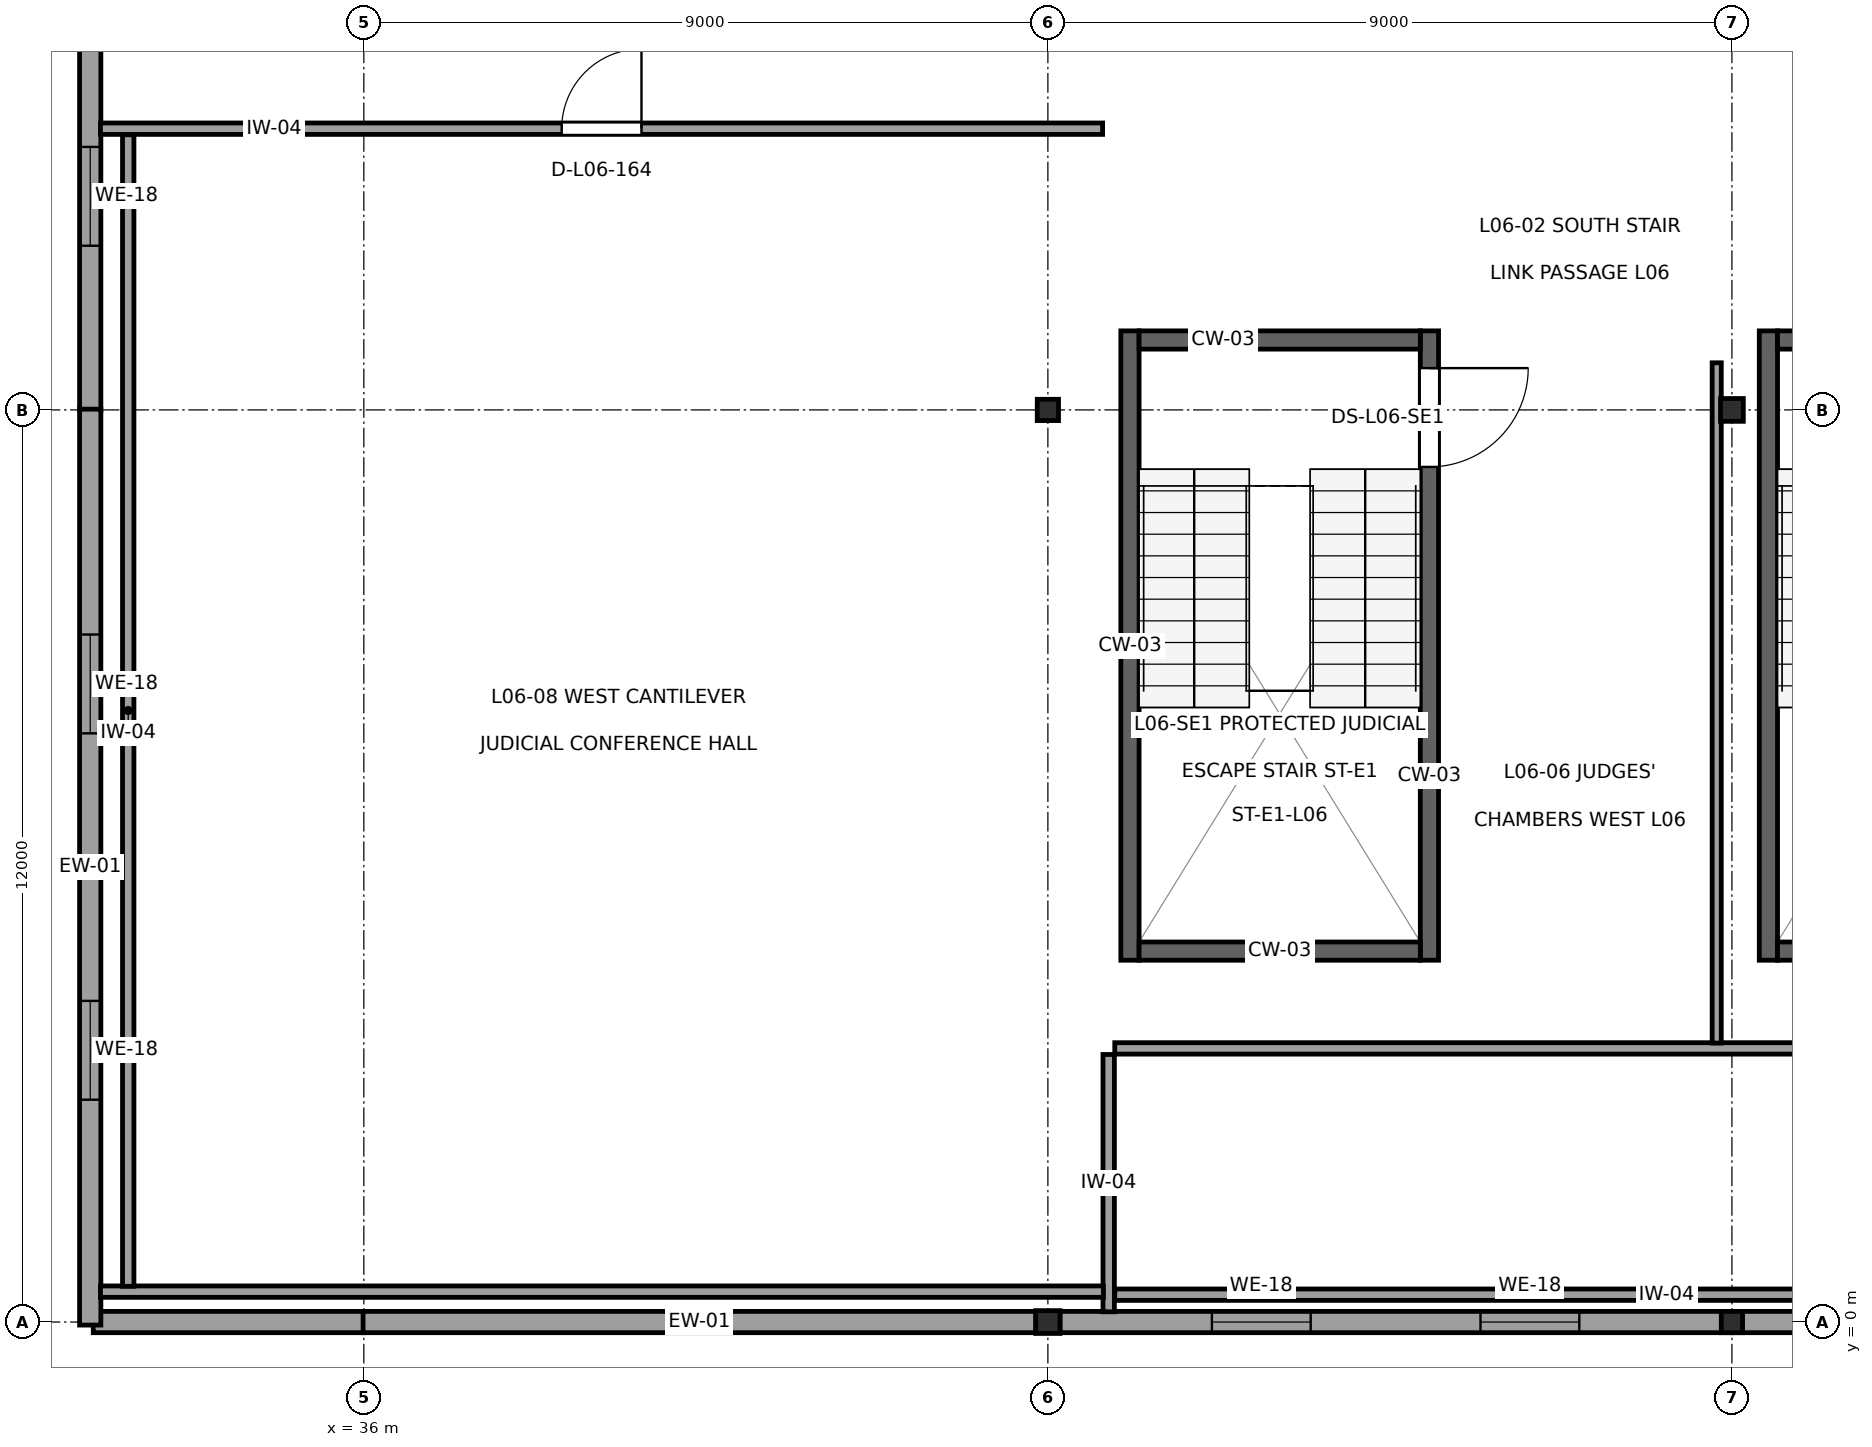
"""IFC4 building model, lengths in metres.
Left out: names, types, materials, properties, quantities, classifications, styles, units other than length and angle.
Written with IfcOpenShell. Run it as: python <this file> out.ifc"""

import sys

from ifc_helpers import new_model, si_unit, direction, frame, frame_2d, origin, origin_2d, place, context, subcontext, project, spatial, rectangle, i_section, extrude, element, fill, save


model = new_model("IFC4")
c1 = context("Model", 3, precision=1e-05, world=origin(), true_north=direction((0.0, 1.0)))
c2 = subcontext(c1, "Body", "Model", "MODEL_VIEW")
j1 = project(units=[si_unit("LENGTHUNIT", "METRE"), si_unit("PLANEANGLEUNIT", "RADIAN")], contexts=[c1])
p1 = place(None, origin())
s1 = spatial("IfcSite", under=j1, at=p1, CompositionType="ELEMENT")
p2 = place(p1, origin())
s2 = spatial("IfcBuilding", under=s1, at=p2, CompositionType="ELEMENT")
p3 = place(p2, frame((0.0, 0.0, 27.4)))
s3 = spatial("IfcBuildingStorey", under=s2, at=p3, CompositionType="ELEMENT", Elevation=27.4)
p4 = place(p3, frame((45.0, 0.0, 0.0), z_axis=(0.0, 0.0, 1.0), x_axis=(0.0, 1.0, 0.0)))
e1 = element("IfcColumn", 1, at=p4, inside=s3, PredefinedType="COLUMN", context=c2, shape_type="SweptSolid", body=[
    extrude(i_section(OverallWidth=0.3, OverallDepth=0.32, WebThickness=0.011, FlangeThickness=0.021, at=origin_2d()), origin(), (0.0, 0.0, 1.0), 4.0),
])
for number, where, z_axis, x_axis in (
    (2, (45.0, 12.0, 0.0), (0.0, 0.0, 1.0), (1.0, 0.0, 0.0)),
    (3, (54.0, 0.0, 0.0), (0.0, 0.0, 1.0), (1.0, 0.0, 0.0)),
):
    element("IfcColumn", number, at=place(p3, frame(where, z_axis=z_axis, x_axis=x_axis)), inside=s3, PredefinedType="COLUMN", context=c2, shape_type="SweptSolid", body=[
        extrude(i_section(OverallWidth=0.28, OverallDepth=0.28, WebThickness=0.01, FlangeThickness=0.018, at=origin_2d()), origin(), (0.0, 0.0, 1.0), 4.0),
    ])
p5 = place(p3, frame((54.0, 12.0, 0.0), z_axis=(0.0, 0.0, 1.0), x_axis=(1.0, 0.0, 0.0)))
e4 = element("IfcColumn", 4, at=p5, inside=s3, PredefinedType="COLUMN", context=c2, shape_type="SweptSolid", body=[
    extrude(i_section(OverallWidth=0.3, OverallDepth=0.3, WebThickness=0.011, FlangeThickness=0.019, at=origin_2d()), origin(), (0.0, 0.0, 1.0), 4.0),
])
p6 = place(p3, frame((32.44, 0.0, 0.0), z_axis=(0.0, 0.0, 1.0), x_axis=(1.0, 0.0, 0.0)))
e5 = element("IfcWall", 5, at=p6, inside=s3, PredefinedType="SOLIDWALL", context=c2, shape_type="SweptSolid", body=[
    extrude(rectangle(XDim=3.57, YDim=0.28, at=frame_2d((1.785, 0.0))), origin(), (0.0, 0.0, 1.0), 2.787),
])
p7 = place(p3, frame((35.99, 0.0, 0.0), z_axis=(0.0, 0.0, 1.0), x_axis=(1.0, 0.0, 0.0)))
e6 = element("IfcWall", 6, at=p7, inside=s3, PredefinedType="SOLIDWALL", context=c2, shape_type="SweptSolid", body=[
    extrude(rectangle(XDim=8.852, YDim=0.28, at=frame_2d((4.426, 0.0))), origin(), (0.0, 0.0, 1.0), 2.787),
])
p8 = place(p3, frame((45.158, 0.0, 0.0), z_axis=(0.0, 0.0, 1.0), x_axis=(1.0, 0.0, 0.0)))
e7 = element("IfcWall", 7, at=p8, inside=s3, PredefinedType="SOLIDWALL", context=c2, shape_type="SweptSolid", body=[
    extrude(rectangle(XDim=8.834, YDim=0.28, at=frame_2d((4.417, 0.0))), origin(), (0.0, 0.0, 1.0), 2.787),
])
p9 = place(p8, frame((2.0, 0.0, 1.05)))
e8 = element("IfcOpeningElement", 8, at=p9, cuts=e7, PredefinedType="OPENING", context=c2, shape_type="SweptSolid", body=[
    extrude(rectangle(XDim=1.3, YDim=1.3, at=frame_2d((0.65, 0.65))), frame((0.0, 0.155, 0.0), z_axis=(0.0, -1.0, 0.0), x_axis=(1.0, 0.0, 0.0)), (0.0, 0.0, 1.0), 0.31),
])
p10 = place(p8, frame((5.534, 0.0, 1.05)))
e9 = element("IfcOpeningElement", 9, at=p10, cuts=e7, PredefinedType="OPENING", context=c2, shape_type="SweptSolid", body=[
    extrude(rectangle(XDim=1.3, YDim=1.3, at=frame_2d((0.65, 0.65))), frame((0.0, 0.155, 0.0), z_axis=(0.0, -1.0, 0.0), x_axis=(1.0, 0.0, 0.0)), (0.0, 0.0, 1.0), 0.31),
])
p11 = place(p3, frame((54.008, 0.0, 0.0), z_axis=(0.0, 0.0, 1.0), x_axis=(1.0, 0.0, 0.0)))
e10 = element("IfcWall", 10, at=p11, inside=s3, PredefinedType="SOLIDWALL", context=c2, shape_type="SweptSolid", body=[
    extrude(rectangle(XDim=8.984, YDim=0.28, at=frame_2d((4.492, 0.0))), origin(), (0.0, 0.0, 1.0), 2.787),
])
p12 = place(p11, frame((2.045, 0.0, 1.05)))
e11 = element("IfcOpeningElement", 11, at=p12, cuts=e10, PredefinedType="OPENING", context=c2, shape_type="SweptSolid", body=[
    extrude(rectangle(XDim=1.3, YDim=1.3, at=frame_2d((0.65, 0.65))), frame((0.0, 0.155, 0.0), z_axis=(0.0, -1.0, 0.0), x_axis=(1.0, 0.0, 0.0)), (0.0, 0.0, 1.0), 0.31),
])
p13 = place(p11, frame((5.639, 0.0, 1.05)))
e12 = element("IfcOpeningElement", 12, at=p13, cuts=e10, PredefinedType="OPENING", context=c2, shape_type="SweptSolid", body=[
    extrude(rectangle(XDim=1.3, YDim=1.3, at=frame_2d((0.65, 0.65))), frame((0.0, 0.155, 0.0), z_axis=(0.0, -1.0, 0.0), x_axis=(1.0, 0.0, 0.0)), (0.0, 0.0, 1.0), 0.31),
])
p14 = place(p3, frame((32.4, 23.96, 0.0), z_axis=(0.0, 0.0, 1.0), x_axis=(0.0, -1.0, 0.0)))
e13 = element("IfcWall", 13, at=p14, inside=s3, PredefinedType="SOLIDWALL", context=c2, shape_type="SweptSolid", body=[
    extrude(rectangle(XDim=11.97, YDim=0.28, at=frame_2d((5.985, 0.0))), origin(), (0.0, 0.0, 1.0), 3.095),
])
p15 = place(p14, frame((2.941, 0.0, 1.05)))
e14 = element("IfcOpeningElement", 14, at=p15, cuts=e13, PredefinedType="OPENING", context=c2, shape_type="SweptSolid", body=[
    extrude(rectangle(XDim=1.3, YDim=1.3, at=frame_2d((0.65, 0.65))), frame((0.0, 0.155, 0.0), z_axis=(0.0, -1.0, 0.0), x_axis=(1.0, 0.0, 0.0)), (0.0, 0.0, 1.0), 0.31),
])
p16 = place(p14, frame((8.5, 0.0, 1.05)))
e15 = element("IfcOpeningElement", 15, at=p16, cuts=e13, PredefinedType="OPENING", context=c2, shape_type="SweptSolid", body=[
    extrude(rectangle(XDim=1.3, YDim=1.3, at=frame_2d((0.65, 0.65))), frame((0.0, 0.155, 0.0), z_axis=(0.0, -1.0, 0.0), x_axis=(1.0, 0.0, 0.0)), (0.0, 0.0, 1.0), 0.31),
])
p17 = place(p3, frame((32.4, 12.01, 0.0), z_axis=(0.0, 0.0, 1.0), x_axis=(0.0, -1.0, 0.0)))
e16 = element("IfcWall", 16, at=p17, inside=s3, PredefinedType="SOLIDWALL", context=c2, shape_type="SweptSolid", body=[
    extrude(rectangle(XDim=12.05, YDim=0.28, at=frame_2d((6.025, 0.0))), origin(), (0.0, 0.0, 1.0), 3.095),
])
p18 = place(p17, frame((2.965, 0.0, 1.05)))
e17 = element("IfcOpeningElement", 17, at=p18, cuts=e16, PredefinedType="OPENING", context=c2, shape_type="SweptSolid", body=[
    extrude(rectangle(XDim=1.3, YDim=1.3, at=frame_2d((0.65, 0.65))), frame((0.0, 0.155, 0.0), z_axis=(0.0, -1.0, 0.0), x_axis=(1.0, 0.0, 0.0)), (0.0, 0.0, 1.0), 0.31),
])
p19 = place(p17, frame((7.785, 0.0, 1.05)))
e18 = element("IfcOpeningElement", 18, at=p19, cuts=e16, PredefinedType="OPENING", context=c2, shape_type="SweptSolid", body=[
    extrude(rectangle(XDim=1.3, YDim=1.3, at=frame_2d((0.65, 0.65))), frame((0.0, 0.155, 0.0), z_axis=(0.0, -1.0, 0.0), x_axis=(1.0, 0.0, 0.0)), (0.0, 0.0, 1.0), 0.31),
])
p20 = place(p3, frame((54.48, 4.76, 0.0), z_axis=(0.0, 0.0, 1.0), x_axis=(0.0, 1.0, 0.0)))
e19 = element("IfcWall", 19, at=p20, inside=s3, PredefinedType="SHEAR", context=c2, shape_type="SweptSolid", body=[
    extrude(rectangle(XDim=8.28, YDim=0.24, at=frame_2d((4.14, 0.0))), origin(), (0.0, 0.0, 1.0), 3.81),
])
for number, where, z_axis, x_axis in (
    (20, (54.6, 4.88, 0.0), (0.0, 0.0, 1.0), (1.0, 0.0, 0.0)),
    (21, (54.6, 12.92, 0.0), (0.0, 0.0, 1.0), (1.0, 0.0, 0.0)),
):
    element("IfcWall", number, at=place(p3, frame(where, z_axis=z_axis, x_axis=x_axis)), inside=s3, PredefinedType="SHEAR", context=c2, shape_type="SweptSolid", body=[
        extrude(rectangle(XDim=3.7, YDim=0.24, at=frame_2d((1.85, 0.0))), origin(), (0.0, 0.0, 1.0), 3.81),
    ])
p21 = place(p3, frame((46.08, 4.76, 0.0), z_axis=(0.0, 0.0, 1.0), x_axis=(0.0, 1.0, 0.0)))
e22 = element("IfcWall", 22, at=p21, inside=s3, PredefinedType="SHEAR", context=c2, shape_type="SweptSolid", body=[
    extrude(rectangle(XDim=8.28, YDim=0.24, at=frame_2d((4.14, 0.0))), origin(), (0.0, 0.0, 1.0), 3.81),
])
p22 = place(p3, frame((50.02, 4.76, 0.0), z_axis=(0.0, 0.0, 1.0), x_axis=(0.0, 1.0, 0.0)))
e23 = element("IfcWall", 23, at=p22, inside=s3, PredefinedType="SHEAR", context=c2, shape_type="SweptSolid", body=[
    extrude(rectangle(XDim=8.28, YDim=0.24, at=frame_2d((4.14, 0.0))), origin(), (0.0, 0.0, 1.0), 3.81),
])
p23 = place(p22, frame((6.49, 0.0, 0.0)))
e24 = element("IfcOpeningElement", 24, at=p23, cuts=e23, PredefinedType="OPENING", context=c2, shape_type="SweptSolid", body=[
    extrude(rectangle(XDim=1.3, YDim=2.2, at=frame_2d((0.65, 1.1))), frame((0.0, 0.135, 0.0), z_axis=(0.0, -1.0, 0.0), x_axis=(1.0, 0.0, 0.0)), (0.0, 0.0, 1.0), 0.27),
])
for number, where, z_axis, x_axis in (
    (25, (46.2, 4.88, 0.0), (0.0, 0.0, 1.0), (1.0, 0.0, 0.0)),
    (26, (46.2, 12.92, 0.0), (0.0, 0.0, 1.0), (1.0, 0.0, 0.0)),
):
    element("IfcWall", number, at=place(p3, frame(where, z_axis=z_axis, x_axis=x_axis)), inside=s3, PredefinedType="SHEAR", context=c2, shape_type="SweptSolid", body=[
        extrude(rectangle(XDim=3.7, YDim=0.24, at=frame_2d((1.85, 0.0))), origin(), (0.0, 0.0, 1.0), 3.81),
    ])
p24 = place(p3, frame((71.92, 0.36, 0.0), z_axis=(0.0, 0.0, 1.0), x_axis=(-1.0, 0.0, 0.0)))
e27 = element("IfcWall", 27, at=p24, inside=s3, PredefinedType="PARTITIONING", context=c2, shape_type="SweptSolid", body=[
    extrude(rectangle(XDim=26.04, YDim=0.15, at=frame_2d((13.02, 0.0))), origin(), (0.0, 0.0, 1.0), 3.64),
])
p25 = place(p3, frame((45.8, 0.135, 0.0), z_axis=(0.0, 0.0, 1.0), x_axis=(0.0, 1.0, 0.0)))
e28 = element("IfcWall", 28, at=p25, inside=s3, PredefinedType="PARTITIONING", context=c2, shape_type="SweptSolid", body=[
    extrude(rectangle(XDim=3.385, YDim=0.15, at=frame_2d((1.692, 0.0))), origin(), (0.0, 0.0, 1.0), 3.64),
])
p26 = place(p3, frame((45.88, 3.6, 0.0), z_axis=(0.0, 0.0, 1.0), x_axis=(1.0, 0.0, 0.0)))
e29 = element("IfcWall", 29, at=p26, inside=s3, PredefinedType="PARTITIONING", context=c2, shape_type="SweptSolid", body=[
    extrude(rectangle(XDim=58.24, YDim=0.15, at=frame_2d((29.12, 0.0))), origin(), (0.0, 0.0, 1.0), 3.64),
])
p27 = place(p26, frame((27.795, 0.0, 0.0)))
e30 = element("IfcOpeningElement", 30, at=p27, cuts=e29, PredefinedType="OPENING", context=c2, shape_type="SweptSolid", body=[
    extrude(rectangle(XDim=1.05, YDim=2.25, at=frame_2d((0.525, 1.125))), frame((0.0, 0.09, 0.0), z_axis=(0.0, -1.0, 0.0), x_axis=(1.0, 0.0, 0.0)), (0.0, 0.0, 1.0), 0.18),
])
p28 = place(p3, frame((53.8, 12.62, 0.0), z_axis=(0.0, 0.0, 1.0), x_axis=(0.0, -1.0, 0.0)))
e31 = element("IfcWall", 31, at=p28, inside=s3, PredefinedType="PARTITIONING", context=c2, shape_type="SweptSolid", body=[
    extrude(rectangle(XDim=8.95, YDim=0.12, at=frame_2d((4.475, 0.0))), origin(), (0.0, 0.0, 1.0), 3.405),
])
p29 = place(p3, frame((45.73, 0.4, 0.0), z_axis=(0.0, 0.0, 1.0), x_axis=(-1.0, 0.0, 0.0)))
e32 = element("IfcWall", 32, at=p29, inside=s3, PredefinedType="PARTITIONING", context=c2, shape_type="SweptSolid", body=[
    extrude(rectangle(XDim=13.195, YDim=0.15, at=frame_2d((6.598, 0.0))), origin(), (0.0, 0.0, 1.0), 3.64),
])
p30 = place(p3, frame((32.9, 0.47, 0.0), z_axis=(0.0, 0.0, 1.0), x_axis=(0.0, 1.0, 0.0)))
e33 = element("IfcWall", 33, at=p30, inside=s3, PredefinedType="PARTITIONING", context=c2, shape_type="SweptSolid", body=[
    extrude(rectangle(XDim=15.15, YDim=0.15, at=frame_2d((7.575, 0.0))), origin(), (0.0, 0.0, 1.0), 3.64),
])
p31 = place(p3, frame((32.535, 15.7, 0.0), z_axis=(0.0, 0.0, 1.0), x_axis=(1.0, 0.0, 0.0)))
e34 = element("IfcWall", 34, at=p31, inside=s3, PredefinedType="PARTITIONING", context=c2, shape_type="SweptSolid", body=[
    extrude(rectangle(XDim=13.185, YDim=0.15, at=frame_2d((6.593, 0.0))), origin(), (0.0, 0.0, 1.0), 3.64),
])
p32 = place(p31, frame((6.068, 0.0, 0.0)))
e35 = element("IfcOpeningElement", 35, at=p32, cuts=e34, PredefinedType="OPENING", context=c2, shape_type="SweptSolid", body=[
    extrude(rectangle(XDim=1.05, YDim=2.25, at=frame_2d((0.525, 1.125))), frame((0.0, 0.09, 0.0), z_axis=(0.0, -1.0, 0.0), x_axis=(1.0, 0.0, 0.0)), (0.0, 0.0, 1.0), 0.18),
])
p33 = place(p9, origin())
e36 = element("IfcWindow", 36, at=p33, inside=s3, PartitioningType="SINGLE_PANEL", PredefinedType="WINDOW", context=c2, shape_type="SweptSolid", body=[
    extrude(rectangle(XDim=1.3, YDim=1.3, at=frame_2d((0.65, 0.65))), frame((0.0, 0.03, 0.0), z_axis=(0.0, -1.0, 0.0), x_axis=(1.0, 0.0, 0.0)), (0.0, 0.0, 1.0), 0.06),
])
fill(e8, e36)
p34 = place(p10, origin())
e37 = element("IfcWindow", 37, at=p34, inside=s3, PartitioningType="SINGLE_PANEL", PredefinedType="WINDOW", context=c2, shape_type="SweptSolid", body=[
    extrude(rectangle(XDim=1.3, YDim=1.3, at=frame_2d((0.65, 0.65))), frame((0.0, 0.03, 0.0), z_axis=(0.0, -1.0, 0.0), x_axis=(1.0, 0.0, 0.0)), (0.0, 0.0, 1.0), 0.06),
])
fill(e9, e37)
p35 = place(p16, origin())
e38 = element("IfcWindow", 38, at=p35, inside=s3, PartitioningType="SINGLE_PANEL", PredefinedType="WINDOW", context=c2, shape_type="SweptSolid", body=[
    extrude(rectangle(XDim=1.3, YDim=1.3, at=frame_2d((0.65, 0.65))), frame((0.0, 0.03, 0.0), z_axis=(0.0, -1.0, 0.0), x_axis=(1.0, 0.0, 0.0)), (0.0, 0.0, 1.0), 0.06),
])
fill(e15, e38)
p36 = place(p18, origin())
e39 = element("IfcWindow", 39, at=p36, inside=s3, PartitioningType="SINGLE_PANEL", PredefinedType="WINDOW", context=c2, shape_type="SweptSolid", body=[
    extrude(rectangle(XDim=1.3, YDim=1.3, at=frame_2d((0.65, 0.65))), frame((0.0, 0.03, 0.0), z_axis=(0.0, -1.0, 0.0), x_axis=(1.0, 0.0, 0.0)), (0.0, 0.0, 1.0), 0.06),
])
fill(e17, e39)
p37 = place(p19, origin())
e40 = element("IfcWindow", 40, at=p37, inside=s3, PartitioningType="SINGLE_PANEL", PredefinedType="WINDOW", context=c2, shape_type="SweptSolid", body=[
    extrude(rectangle(XDim=1.3, YDim=1.3, at=frame_2d((0.65, 0.65))), frame((0.0, 0.03, 0.0), z_axis=(0.0, -1.0, 0.0), x_axis=(1.0, 0.0, 0.0)), (0.0, 0.0, 1.0), 0.06),
])
fill(e18, e40)
p38 = place(p23, frame((1.3, 0.0, 0.0), z_axis=(0.0, 0.0, 1.0), x_axis=(-1.0, 0.0, 0.0)))
e41 = element("IfcDoor", 41, at=p38, inside=s3, OperationType="SINGLE_SWING_RIGHT", PredefinedType="DOOR", context=c2, shape_type="SweptSolid", body=[
    extrude(rectangle(XDim=1.3, YDim=2.2, at=frame_2d((0.65, 1.1))), frame((0.0, 0.025, 0.0), z_axis=(0.0, -1.0, 0.0), x_axis=(1.0, 0.0, 0.0)), (0.0, 0.0, 1.0), 0.05),
])
fill(e24, e41)
p39 = place(p32, origin())
e42 = element("IfcDoor", 42, at=p39, inside=s3, OperationType="SINGLE_SWING_RIGHT", PredefinedType="DOOR", context=c2, shape_type="SweptSolid", body=[
    extrude(rectangle(XDim=1.05, YDim=2.25, at=frame_2d((0.525, 1.125))), frame((0.0, 0.025, 0.0), z_axis=(0.0, -1.0, 0.0), x_axis=(1.0, 0.0, 0.0)), (0.0, 0.0, 1.0), 0.05),
])
fill(e35, e42)
save(model, sys.argv[1])
